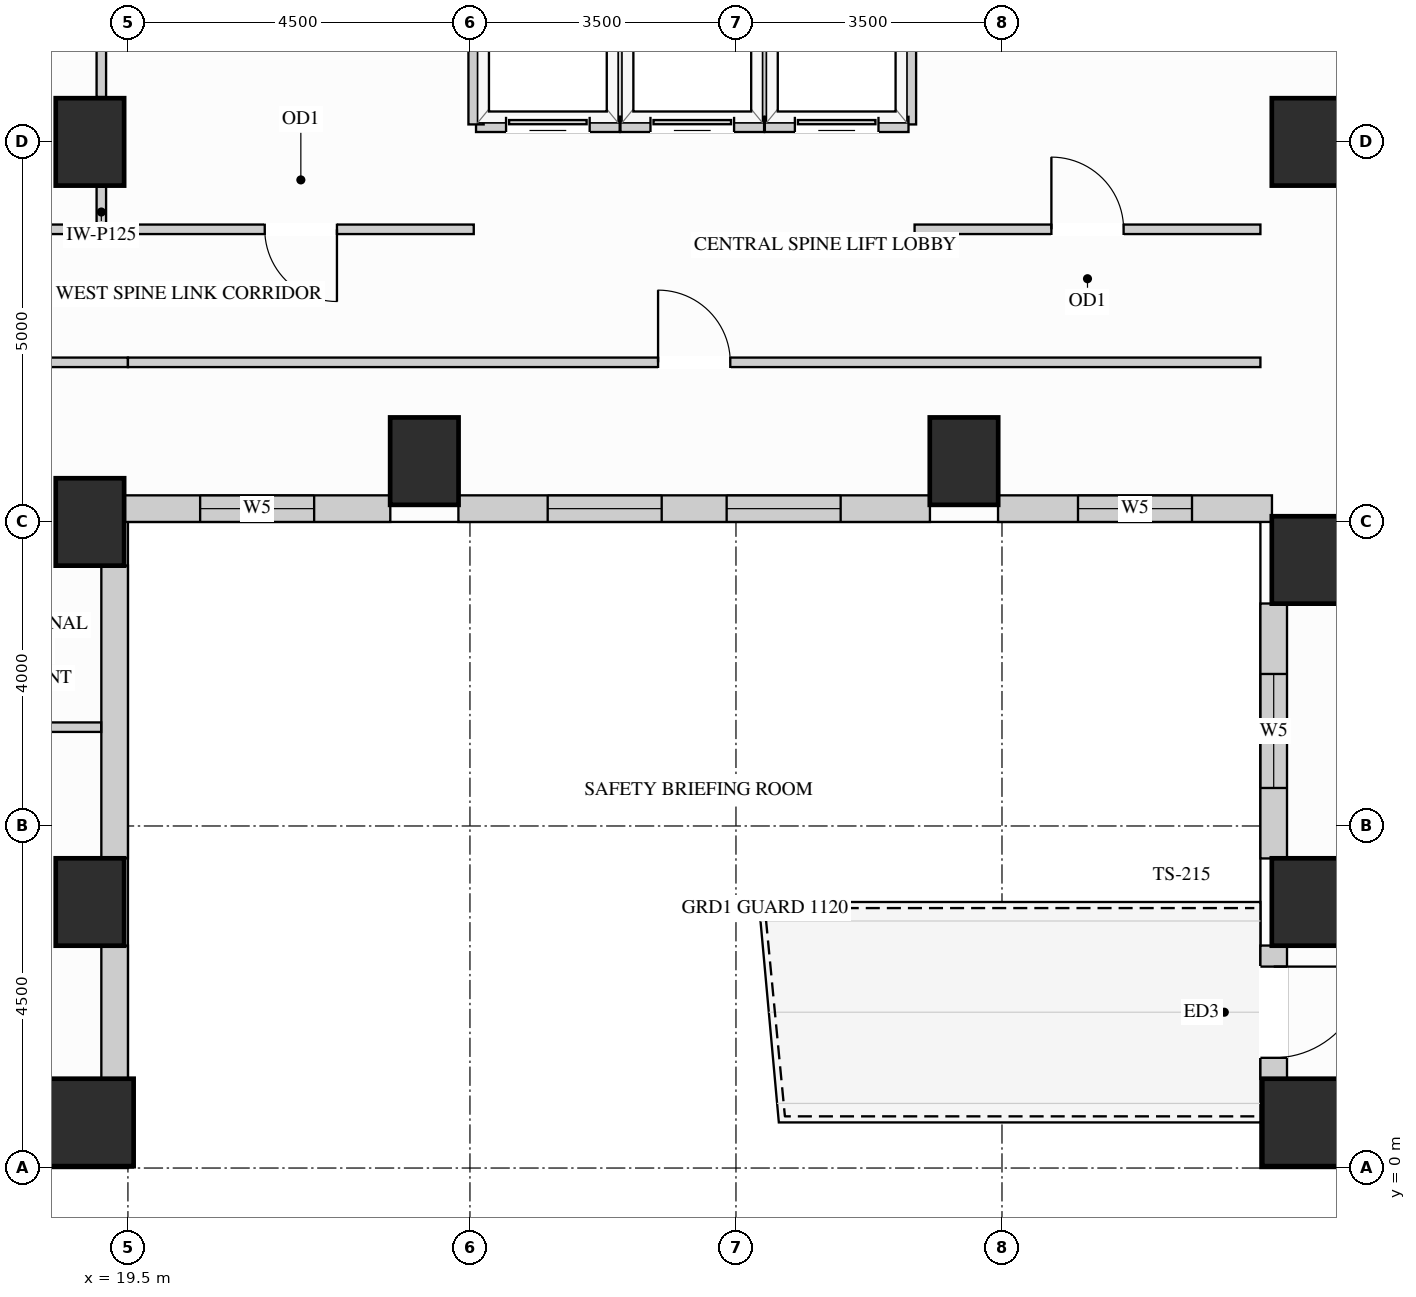
"""IFC4 building model, lengths in metres.
Left out: names, types, materials, properties, quantities, classifications, styles, units other than length and angle.
Written with IfcOpenShell. Run it as: python <this file> out.ifc"""

import sys

from ifc_helpers import new_model, si_unit, direction, frame, frame_2d, origin, origin_2d, place, context, subcontext, project, spatial, rectangle, extrude, source, transform, mapped, element, fill, save


model = new_model("IFC4")
c1 = context("Model", 3, precision=1e-05, world=origin(), true_north=direction((0.0, 1.0)))
c2 = subcontext(c1, "Body", "Model", "MODEL_VIEW")
j1 = project(units=[si_unit("LENGTHUNIT", "METRE"), si_unit("PLANEANGLEUNIT", "RADIAN")], contexts=[c1])
p1 = place(None, origin())
s1 = spatial("IfcSite", under=j1, at=p1, CompositionType="ELEMENT")
p2 = place(p1, origin())
s2 = spatial("IfcBuilding", under=s1, at=p2, CompositionType="ELEMENT")
p3 = place(p2, frame((0.0, 0.0, 91.8)))
s3 = spatial("IfcBuildingStorey", under=s2, at=p3, CompositionType="ELEMENT", Elevation=91.8)
m1 = source(origin(), c2, "Body", "SweptSolid", [
    extrude(rectangle(XDim=0.9, YDim=1.15, at=origin_2d()), origin(), (0.0, 0.0, 1.0), 3.38),
])
for number, where, z_axis, x_axis in (
    (1, (19.0, 13.5, 0.0), (0.0, 0.0, 1.0), (1.0, 0.0, 0.0)),
    (2, (19.0, 3.5, 0.0), (0.0, 0.0, 1.0), (1.0, 0.0, 0.0)),
    (3, (19.0, 8.5, 0.0), (0.0, 0.0, 1.0), (1.0, 0.0, 0.0)),
    (4, (35.0, 13.5, 0.0), (0.0, 0.0, 1.0), (1.0, 0.0, 0.0)),
    (5, (35.0, 3.5, 0.0), (0.0, 0.0, 1.0), (1.0, 0.0, 0.0)),
    (6, (35.0, 8.0, 0.0), (0.0, 0.0, 1.0), (1.0, 0.0, 0.0)),
    (7, (23.4, 9.3, 0.0), (0.0, 0.0, 1.0), (1.0, 0.0, 0.0)),
    (8, (30.5, 9.3, 0.0), (0.0, 0.0, 1.0), (1.0, 0.0, 0.0)),
):
    element("IfcColumn", number, at=place(p3, frame(where, z_axis=z_axis, x_axis=x_axis)), inside=s3, PredefinedType="COLUMN", context=c2, shape_type="MappedRepresentation", body=[
        mapped(m1, transform((0.0, 0.0, 0.0), x_axis=(1.0, 0.0, 0.0), y_axis=(0.0, 1.0, 0.0), z_axis=(0.0, 0.0, 1.0))),
    ])
m2 = source(origin(), c2, "Body", "SweptSolid", [
    extrude(rectangle(XDim=1.15, YDim=1.15, at=origin_2d()), origin(), (0.0, 0.0, 1.0), 3.38),
])
for number, where, z_axis, x_axis in (
    (9, (19.0, 0.6, 0.0), (0.0, 0.0, 1.0), (1.0, 0.0, 0.0)),
    (10, (35.0, 0.6, 0.0), (0.0, 0.0, 1.0), (1.0, 0.0, 0.0)),
):
    element("IfcColumn", number, at=place(p3, frame(where, z_axis=z_axis, x_axis=x_axis)), inside=s3, PredefinedType="COLUMN", context=c2, shape_type="MappedRepresentation", body=[
        mapped(m2, transform((0.0, 0.0, 0.0), x_axis=(1.0, 0.0, 0.0), y_axis=(0.0, 1.0, 0.0), z_axis=(0.0, 0.0, 1.0))),
    ])
m3 = source(origin(), c2, "Body", "SweptSolid", [
    extrude(rectangle(XDim=1.754, YDim=0.35, at=frame_2d((0.877, 0.0))), origin(), (0.0, 0.0, 1.0), 2.519),
])
p4 = place(p3, frame((19.325, 1.173, 0.0), z_axis=(0.0, 0.0, 1.0), x_axis=(0.0, 1.0, 0.0)))
e11 = element("IfcWall", 11, at=p4, inside=s3, PredefinedType="SOLIDWALL", context=c2, shape_type="MappedRepresentation", body=[
    mapped(m3, transform((0.0, 0.0, 0.0), x_axis=(1.0, 0.0, 0.0), y_axis=(0.0, 1.0, 0.0), z_axis=(0.0, 0.0, 1.0))),
])
m4 = source(origin(), c2, "Body", "SweptSolid", [
    extrude(rectangle(XDim=3.854, YDim=0.35, at=frame_2d((1.927, 0.0))), origin(), (0.0, 0.0, 1.0), 2.519),
])
p5 = place(p3, frame((19.325, 4.073, 0.0), z_axis=(0.0, 0.0, 1.0), x_axis=(0.0, 1.0, 0.0)))
e12 = element("IfcWall", 12, at=p5, inside=s3, PredefinedType="SOLIDWALL", context=c2, shape_type="MappedRepresentation", body=[
    mapped(m4, transform((0.0, 0.0, 0.0), x_axis=(1.0, 0.0, 0.0), y_axis=(0.0, 1.0, 0.0), z_axis=(0.0, 0.0, 1.0))),
])
p6 = place(p3, frame((19.448, 8.675, 0.0), z_axis=(0.0, 0.0, 1.0), x_axis=(1.0, 0.0, 0.0)))
e13 = element("IfcWall", 13, at=p6, inside=s3, PredefinedType="SOLIDWALL", context=c2, shape_type="SweptSolid", body=[
    extrude(rectangle(XDim=3.504, YDim=0.35, at=frame_2d((1.752, 0.0))), origin(), (0.0, 0.0, 1.0), 3.365),
])
p7 = place(p6, frame((1.002, 0.0, 0.78)))
e14 = element("IfcOpeningElement", 14, at=p7, cuts=e13, PredefinedType="OPENING", context=c2, shape_type="SweptSolid", body=[
    extrude(rectangle(XDim=1.5, YDim=2.0, at=frame_2d((0.75, 1.0))), frame((0.0, 0.185, 0.0), z_axis=(0.0, -1.0, 0.0), x_axis=(1.0, 0.0, 0.0)), (0.0, 0.0, 1.0), 0.37),
])
p8 = place(p3, frame((23.848, 8.675, 0.0), z_axis=(0.0, 0.0, 1.0), x_axis=(1.0, 0.0, 0.0)))
e15 = element("IfcWall", 15, at=p8, inside=s3, PredefinedType="SOLIDWALL", context=c2, shape_type="SweptSolid", body=[
    extrude(rectangle(XDim=6.204, YDim=0.35, at=frame_2d((3.102, 0.0))), origin(), (0.0, 0.0, 1.0), 3.365),
])
p9 = place(p8, frame((1.175, 0.0, 0.78)))
e16 = element("IfcOpeningElement", 16, at=p9, cuts=e15, PredefinedType="OPENING", context=c2, shape_type="SweptSolid", body=[
    extrude(rectangle(XDim=1.5, YDim=2.0, at=frame_2d((0.75, 1.0))), frame((0.0, 0.185, 0.0), z_axis=(0.0, -1.0, 0.0), x_axis=(1.0, 0.0, 0.0)), (0.0, 0.0, 1.0), 0.37),
])
p10 = place(p8, frame((3.529, 0.0, 0.78)))
e17 = element("IfcOpeningElement", 17, at=p10, cuts=e15, PredefinedType="OPENING", context=c2, shape_type="SweptSolid", body=[
    extrude(rectangle(XDim=1.5, YDim=2.0, at=frame_2d((0.75, 1.0))), frame((0.0, 0.185, 0.0), z_axis=(0.0, -1.0, 0.0), x_axis=(1.0, 0.0, 0.0)), (0.0, 0.0, 1.0), 0.37),
])
p11 = place(p3, frame((30.948, 8.675, 0.0), z_axis=(0.0, 0.0, 1.0), x_axis=(1.0, 0.0, 0.0)))
e18 = element("IfcWall", 18, at=p11, inside=s3, PredefinedType="SOLIDWALL", context=c2, shape_type="SweptSolid", body=[
    extrude(rectangle(XDim=3.604, YDim=0.35, at=frame_2d((1.802, 0.0))), origin(), (0.0, 0.0, 1.0), 3.365),
])
p12 = place(p11, frame((1.052, 0.0, 0.78)))
e19 = element("IfcOpeningElement", 19, at=p12, cuts=e18, PredefinedType="OPENING", context=c2, shape_type="SweptSolid", body=[
    extrude(rectangle(XDim=1.5, YDim=2.0, at=frame_2d((0.75, 1.0))), frame((0.0, 0.185, 0.0), z_axis=(0.0, -1.0, 0.0), x_axis=(1.0, 0.0, 0.0)), (0.0, 0.0, 1.0), 0.37),
])
p13 = place(p3, frame((34.575, 7.427, 0.0), z_axis=(0.0, 0.0, 1.0), x_axis=(0.0, -1.0, 0.0)))
e20 = element("IfcWall", 20, at=p13, inside=s3, PredefinedType="SOLIDWALL", context=c2, shape_type="SweptSolid", body=[
    extrude(rectangle(XDim=3.354, YDim=0.35, at=frame_2d((1.677, 0.0))), origin(), (0.0, 0.0, 1.0), 3.365),
])
p14 = place(p13, frame((0.927, 0.0, 0.78)))
e21 = element("IfcOpeningElement", 21, at=p14, cuts=e20, PredefinedType="OPENING", context=c2, shape_type="SweptSolid", body=[
    extrude(rectangle(XDim=1.5, YDim=2.0, at=frame_2d((0.75, 1.0))), frame((0.0, 0.185, 0.0), z_axis=(0.0, -1.0, 0.0), x_axis=(1.0, 0.0, 0.0)), (0.0, 0.0, 1.0), 0.37),
])
p15 = place(p3, frame((34.575, 2.927, 0.0), z_axis=(0.0, 0.0, 1.0), x_axis=(0.0, -1.0, 0.0)))
e22 = element("IfcWall", 22, at=p15, inside=s3, PredefinedType="SOLIDWALL", context=c2, shape_type="SweptSolid", body=[
    extrude(rectangle(XDim=1.754, YDim=0.35, at=frame_2d((0.877, 0.0))), origin(), (0.0, 0.0, 1.0), 3.365),
])
p16 = place(p15, frame((0.277, 0.0, 0.0)))
e23 = element("IfcOpeningElement", 23, at=p16, cuts=e22, PredefinedType="OPENING", context=c2, shape_type="SweptSolid", body=[
    extrude(rectangle(XDim=1.2, YDim=2.15, at=frame_2d((0.6, 1.075))), frame((0.0, 0.185, 0.0), z_axis=(0.0, -1.0, 0.0), x_axis=(1.0, 0.0, 0.0)), (0.0, 0.0, 1.0), 0.37),
])
m5 = source(origin(), c2, "Body", "SweptSolid", [
    extrude(rectangle(XDim=0.56, YDim=0.125, at=frame_2d((0.28, 0.0))), origin(), (0.0, 0.0, 1.0), 2.677),
])
p17 = place(p3, frame((19.15, 12.35, 0.0), z_axis=(0.0, 0.0, 1.0), x_axis=(0.0, 1.0, 0.0)))
e24 = element("IfcWall", 24, at=p17, inside=s3, PredefinedType="PARTITIONING", context=c2, shape_type="MappedRepresentation", body=[
    mapped(m5, transform((0.0, 0.0, 0.0), x_axis=(1.0, 0.0, 0.0), y_axis=(0.0, 1.0, 0.0), z_axis=(0.0, 0.0, 1.0))),
])
m6 = source(origin(), c2, "Body", "SweptSolid", [
    extrude(rectangle(XDim=3.32, YDim=0.125, at=frame_2d((1.66, 0.0))), origin(), (0.0, 0.0, 1.0), 2.677),
])
p18 = place(p3, frame((19.15, 14.09, 0.0), z_axis=(0.0, 0.0, 1.0), x_axis=(0.0, 1.0, 0.0)))
e25 = element("IfcWall", 25, at=p18, inside=s3, PredefinedType="PARTITIONING", context=c2, shape_type="MappedRepresentation", body=[
    mapped(m6, transform((0.0, 0.0, 0.0), x_axis=(1.0, 0.0, 0.0), y_axis=(0.0, 1.0, 0.0), z_axis=(0.0, 0.0, 1.0))),
])
p19 = place(p3, frame((29.85, 12.35, 0.0), z_axis=(0.0, 0.0, 1.0), x_axis=(1.0, 0.0, 0.0)))
e26 = element("IfcWall", 26, at=p19, inside=s3, PredefinedType="PARTITIONING", context=c2, shape_type="SweptSolid", body=[
    extrude(rectangle(XDim=4.55, YDim=0.125, at=frame_2d((2.275, 0.0))), origin(), (0.0, 0.0, 1.0), 3.365),
])
p20 = place(p19, frame((1.8, 0.0, 0.0)))
e27 = element("IfcOpeningElement", 27, at=p20, cuts=e26, PredefinedType="OPENING", context=c2, shape_type="SweptSolid", body=[
    extrude(rectangle(XDim=0.95, YDim=2.15, at=frame_2d((0.475, 1.075))), frame((0.0, 0.073, 0.0), z_axis=(0.0, -1.0, 0.0), x_axis=(1.0, 0.0, 0.0)), (0.0, 0.0, 1.0), 0.145),
])
m7 = source(origin(), c2, "Body", "SweptSolid", [
    extrude(rectangle(XDim=2.95, YDim=0.125, at=frame_2d((1.475, 0.0))), origin(), (0.0, 0.0, 1.0), 3.365),
])
p21 = place(p3, frame((16.55, 12.35, 0.0), z_axis=(0.0, 0.0, 1.0), x_axis=(1.0, 0.0, 0.0)))
e28 = element("IfcWall", 28, at=p21, inside=s3, PredefinedType="PARTITIONING", context=c2, shape_type="MappedRepresentation", body=[
    mapped(m7, transform((0.0, 0.0, 0.0), x_axis=(1.0, 0.0, 0.0), y_axis=(0.0, 1.0, 0.0), z_axis=(0.0, 0.0, 1.0))),
])
p22 = place(p3, frame((19.5, 12.35, 0.0), z_axis=(0.0, 0.0, 1.0), x_axis=(1.0, 0.0, 0.0)))
e29 = element("IfcWall", 29, at=p22, inside=s3, PredefinedType="PARTITIONING", context=c2, shape_type="SweptSolid", body=[
    extrude(rectangle(XDim=4.55, YDim=0.125, at=frame_2d((2.275, 0.0))), origin(), (0.0, 0.0, 1.0), 3.365),
])
p23 = place(p22, frame((1.8, 0.0, 0.0)))
e30 = element("IfcOpeningElement", 30, at=p23, cuts=e29, PredefinedType="OPENING", context=c2, shape_type="SweptSolid", body=[
    extrude(rectangle(XDim=0.95, YDim=2.15, at=frame_2d((0.475, 1.075))), frame((0.0, 0.073, 0.0), z_axis=(0.0, -1.0, 0.0), x_axis=(1.0, 0.0, 0.0)), (0.0, 0.0, 1.0), 0.145),
])
p24 = place(p3, frame((16.55, 10.6, 0.0), z_axis=(0.0, 0.0, 1.0), x_axis=(1.0, 0.0, 0.0)))
e31 = element("IfcWall", 31, at=p24, inside=s3, PredefinedType="PARTITIONING", context=c2, shape_type="MappedRepresentation", body=[
    mapped(m7, transform((0.0, 0.0, 0.0), x_axis=(1.0, 0.0, 0.0), y_axis=(0.0, 1.0, 0.0), z_axis=(0.0, 0.0, 1.0))),
])
p25 = place(p3, frame((19.5, 10.6, 0.0), z_axis=(0.0, 0.0, 1.0), x_axis=(1.0, 0.0, 0.0)))
e32 = element("IfcWall", 32, at=p25, inside=s3, PredefinedType="PARTITIONING", context=c2, shape_type="SweptSolid", body=[
    extrude(rectangle(XDim=14.9, YDim=0.125, at=frame_2d((7.45, 0.0))), origin(), (0.0, 0.0, 1.0), 3.365),
])
p26 = place(p25, frame((6.975, 0.0, 0.0)))
e33 = element("IfcOpeningElement", 33, at=p26, cuts=e32, PredefinedType="OPENING", context=c2, shape_type="SweptSolid", body=[
    extrude(rectangle(XDim=0.95, YDim=2.15, at=frame_2d((0.475, 1.075))), frame((0.0, 0.073, 0.0), z_axis=(0.0, -1.0, 0.0), x_axis=(1.0, 0.0, 0.0)), (0.0, 0.0, 1.0), 0.145),
])
m8 = source(origin(), c2, "Body", "SweptSolid", [
    extrude(rectangle(XDim=2.598, YDim=0.125, at=frame_2d((1.299, 0.0))), origin(), (0.0, 0.0, 1.0), 3.365),
])
p27 = place(p3, frame((16.55, 5.8, 0.0), z_axis=(0.0, 0.0, 1.0), x_axis=(1.0, 0.0, 0.0)))
e34 = element("IfcWall", 34, at=p27, inside=s3, PredefinedType="PARTITIONING", context=c2, shape_type="MappedRepresentation", body=[
    mapped(m8, transform((0.0, 0.0, 0.0), x_axis=(1.0, 0.0, 0.0), y_axis=(0.0, 1.0, 0.0), z_axis=(0.0, 0.0, 1.0))),
])
m9 = source(origin(), c2, "Body", "SweptSolid", [
    extrude(rectangle(XDim=2.29, YDim=0.2, at=frame_2d((1.145, 0.0))), origin(), (0.0, 0.0, 1.0), 3.365),
])
p28 = place(p3, frame((25.97, 13.73, 0.0), z_axis=(0.0, 0.0, 1.0), x_axis=(0.0, 1.0, 0.0)))
e35 = element("IfcWall", 35, at=p28, inside=s3, PredefinedType="PARTITIONING", context=c2, shape_type="MappedRepresentation", body=[
    mapped(m9, transform((0.0, 0.0, 0.0), x_axis=(1.0, 0.0, 0.0), y_axis=(0.0, 1.0, 0.0), z_axis=(0.0, 0.0, 1.0))),
])
p29 = place(p3, frame((24.08, 13.73, 0.0), z_axis=(0.0, 0.0, 1.0), x_axis=(1.0, 0.0, 0.0)))
e36 = element("IfcWall", 36, at=p29, inside=s3, PredefinedType="PARTITIONING", context=c2, shape_type="SweptSolid", body=[
    extrude(rectangle(XDim=1.89, YDim=0.2, at=frame_2d((0.945, 0.0))), origin(), (0.0, 0.0, 1.0), 2.446),
])
p30 = place(p29, frame((0.395, 0.0, 0.0)))
e37 = element("IfcOpeningElement", 37, at=p30, cuts=e36, PredefinedType="OPENING", context=c2, shape_type="SweptSolid", body=[
    extrude(rectangle(XDim=1.1, YDim=2.2, at=frame_2d((0.55, 1.1))), frame((0.0, 0.11, 0.0), z_axis=(0.0, -1.0, 0.0), x_axis=(1.0, 0.0, 0.0)), (0.0, 0.0, 1.0), 0.22),
])
for number, where, z_axis, x_axis in (
    (38, (24.08, 13.73, 0.0), (0.0, 0.0, 1.0), (0.0, 1.0, 0.0)),
    (39, (27.87, 13.73, 0.0), (0.0, 0.0, 1.0), (0.0, 1.0, 0.0)),
):
    element("IfcWall", number, at=place(p3, frame(where, z_axis=z_axis, x_axis=x_axis)), inside=s3, PredefinedType="PARTITIONING", context=c2, shape_type="MappedRepresentation", body=[
        mapped(m9, transform((0.0, 0.0, 0.0), x_axis=(1.0, 0.0, 0.0), y_axis=(0.0, 1.0, 0.0), z_axis=(0.0, 0.0, 1.0))),
    ])
p31 = place(p3, frame((25.98, 13.73, 0.0), z_axis=(0.0, 0.0, 1.0), x_axis=(1.0, 0.0, 0.0)))
e40 = element("IfcWall", 40, at=p31, inside=s3, PredefinedType="PARTITIONING", context=c2, shape_type="SweptSolid", body=[
    extrude(rectangle(XDim=1.89, YDim=0.2, at=frame_2d((0.945, 0.0))), origin(), (0.0, 0.0, 1.0), 2.446),
])
p32 = place(p31, frame((0.395, 0.0, 0.0)))
e41 = element("IfcOpeningElement", 41, at=p32, cuts=e40, PredefinedType="OPENING", context=c2, shape_type="SweptSolid", body=[
    extrude(rectangle(XDim=1.1, YDim=2.2, at=frame_2d((0.55, 1.1))), frame((0.0, 0.11, 0.0), z_axis=(0.0, -1.0, 0.0), x_axis=(1.0, 0.0, 0.0)), (0.0, 0.0, 1.0), 0.22),
])
p33 = place(p3, frame((29.77, 13.73, 0.0), z_axis=(0.0, 0.0, 1.0), x_axis=(0.0, 1.0, 0.0)))
e42 = element("IfcWall", 42, at=p33, inside=s3, PredefinedType="PARTITIONING", context=c2, shape_type="MappedRepresentation", body=[
    mapped(m9, transform((0.0, 0.0, 0.0), x_axis=(1.0, 0.0, 0.0), y_axis=(0.0, 1.0, 0.0), z_axis=(0.0, 0.0, 1.0))),
])
p34 = place(p3, frame((27.88, 13.73, 0.0), z_axis=(0.0, 0.0, 1.0), x_axis=(1.0, 0.0, 0.0)))
e43 = element("IfcWall", 43, at=p34, inside=s3, PredefinedType="PARTITIONING", context=c2, shape_type="SweptSolid", body=[
    extrude(rectangle(XDim=1.89, YDim=0.2, at=frame_2d((0.945, 0.0))), origin(), (0.0, 0.0, 1.0), 2.446),
])
p35 = place(p34, frame((0.395, 0.0, 0.0)))
e44 = element("IfcOpeningElement", 44, at=p35, cuts=e43, PredefinedType="OPENING", context=c2, shape_type="SweptSolid", body=[
    extrude(rectangle(XDim=1.1, YDim=2.2, at=frame_2d((0.55, 1.1))), frame((0.0, 0.11, 0.0), z_axis=(0.0, -1.0, 0.0), x_axis=(1.0, 0.0, 0.0)), (0.0, 0.0, 1.0), 0.22),
])
m10 = source(origin(), c2, "Body", "SweptSolid", [
    extrude(rectangle(XDim=1.2, YDim=2.15, at=frame_2d((0.6, 1.075))), frame((0.0, 0.025, 0.0), z_axis=(0.0, -1.0, 0.0), x_axis=(1.0, 0.0, 0.0)), (0.0, 0.0, 1.0), 0.05),
])
p36 = place(p16, frame((1.2, 0.0, 0.0), z_axis=(0.0, 0.0, 1.0), x_axis=(-1.0, 0.0, 0.0)))
e45 = element("IfcDoor", 45, at=p36, inside=s3, OperationType="SINGLE_SWING_LEFT", PredefinedType="DOOR", context=c2, shape_type="MappedRepresentation", body=[
    mapped(m10, transform((0.0, 0.0, 0.0), x_axis=(1.0, 0.0, 0.0), y_axis=(0.0, 1.0, 0.0), z_axis=(0.0, 0.0, 1.0))),
])
fill(e23, e45)
m11 = source(origin(), c2, "Body", "SweptSolid", [
    extrude(rectangle(XDim=1.1, YDim=2.2, at=frame_2d((0.55, 1.1))), frame((0.0, 0.025, 0.0), z_axis=(0.0, -1.0, 0.0), x_axis=(1.0, 0.0, 0.0)), (0.0, 0.0, 1.0), 0.05),
])
p37 = place(p30, origin())
e46 = element("IfcDoor", 46, at=p37, inside=s3, OperationType="SLIDING_TO_LEFT", PredefinedType="DOOR", context=c2, shape_type="MappedRepresentation", body=[
    mapped(m11, transform((0.0, 0.0, 0.0), x_axis=(1.0, 0.0, 0.0), y_axis=(0.0, 1.0, 0.0), z_axis=(0.0, 0.0, 1.0))),
])
fill(e37, e46)
p38 = place(p32, origin())
e47 = element("IfcDoor", 47, at=p38, inside=s3, OperationType="SLIDING_TO_LEFT", PredefinedType="DOOR", context=c2, shape_type="MappedRepresentation", body=[
    mapped(m11, transform((0.0, 0.0, 0.0), x_axis=(1.0, 0.0, 0.0), y_axis=(0.0, 1.0, 0.0), z_axis=(0.0, 0.0, 1.0))),
])
fill(e41, e47)
p39 = place(p35, origin())
e48 = element("IfcDoor", 48, at=p39, inside=s3, OperationType="SLIDING_TO_LEFT", PredefinedType="DOOR", context=c2, shape_type="MappedRepresentation", body=[
    mapped(m11, transform((0.0, 0.0, 0.0), x_axis=(1.0, 0.0, 0.0), y_axis=(0.0, 1.0, 0.0), z_axis=(0.0, 0.0, 1.0))),
])
fill(e44, e48)
m12 = source(origin(), c2, "Body", "SweptSolid", [
    extrude(rectangle(XDim=0.95, YDim=2.15, at=frame_2d((0.475, 1.075))), frame((0.0, 0.025, 0.0), z_axis=(0.0, -1.0, 0.0), x_axis=(1.0, 0.0, 0.0)), (0.0, 0.0, 1.0), 0.05),
])
p40 = place(p23, origin())
e49 = element("IfcDoor", 49, at=p40, inside=s3, OperationType="SINGLE_SWING_RIGHT", PredefinedType="DOOR", context=c2, shape_type="MappedRepresentation", body=[
    mapped(m12, transform((0.0, 0.0, 0.0), x_axis=(1.0, 0.0, 0.0), y_axis=(0.0, 1.0, 0.0), z_axis=(0.0, 0.0, 1.0))),
])
fill(e30, e49)
p41 = place(p20, origin())
e50 = element("IfcDoor", 50, at=p41, inside=s3, OperationType="SINGLE_SWING_LEFT", PredefinedType="DOOR", context=c2, shape_type="MappedRepresentation", body=[
    mapped(m12, transform((0.0, 0.0, 0.0), x_axis=(1.0, 0.0, 0.0), y_axis=(0.0, 1.0, 0.0), z_axis=(0.0, 0.0, 1.0))),
])
fill(e27, e50)
p42 = place(p26, origin())
e51 = element("IfcDoor", 51, at=p42, inside=s3, OperationType="SINGLE_SWING_LEFT", PredefinedType="DOOR", context=c2, shape_type="MappedRepresentation", body=[
    mapped(m12, transform((0.0, 0.0, 0.0), x_axis=(1.0, 0.0, 0.0), y_axis=(0.0, 1.0, 0.0), z_axis=(0.0, 0.0, 1.0))),
])
fill(e33, e51)
m13 = source(origin(), c2, "Body", "SweptSolid", [
    extrude(rectangle(XDim=1.5, YDim=2.0, at=frame_2d((0.75, 1.0))), frame((0.0, 0.03, 0.0), z_axis=(0.0, -1.0, 0.0), x_axis=(1.0, 0.0, 0.0)), (0.0, 0.0, 1.0), 0.06),
])
p43 = place(p7, origin())
e52 = element("IfcWindow", 52, at=p43, inside=s3, PartitioningType="SINGLE_PANEL", PredefinedType="WINDOW", context=c2, shape_type="MappedRepresentation", body=[
    mapped(m13, transform((0.0, 0.0, 0.0), x_axis=(1.0, 0.0, 0.0), y_axis=(0.0, 1.0, 0.0), z_axis=(0.0, 0.0, 1.0))),
])
fill(e14, e52)
p44 = place(p9, origin())
e53 = element("IfcWindow", 53, at=p44, inside=s3, PartitioningType="SINGLE_PANEL", PredefinedType="WINDOW", context=c2, shape_type="MappedRepresentation", body=[
    mapped(m13, transform((0.0, 0.0, 0.0), x_axis=(1.0, 0.0, 0.0), y_axis=(0.0, 1.0, 0.0), z_axis=(0.0, 0.0, 1.0))),
])
fill(e16, e53)
p45 = place(p10, origin())
e54 = element("IfcWindow", 54, at=p45, inside=s3, PartitioningType="SINGLE_PANEL", PredefinedType="WINDOW", context=c2, shape_type="MappedRepresentation", body=[
    mapped(m13, transform((0.0, 0.0, 0.0), x_axis=(1.0, 0.0, 0.0), y_axis=(0.0, 1.0, 0.0), z_axis=(0.0, 0.0, 1.0))),
])
fill(e17, e54)
p46 = place(p12, origin())
e55 = element("IfcWindow", 55, at=p46, inside=s3, PartitioningType="SINGLE_PANEL", PredefinedType="WINDOW", context=c2, shape_type="MappedRepresentation", body=[
    mapped(m13, transform((0.0, 0.0, 0.0), x_axis=(1.0, 0.0, 0.0), y_axis=(0.0, 1.0, 0.0), z_axis=(0.0, 0.0, 1.0))),
])
fill(e19, e55)
p47 = place(p14, origin())
e56 = element("IfcWindow", 56, at=p47, inside=s3, PartitioningType="SINGLE_PANEL", PredefinedType="WINDOW", context=c2, shape_type="MappedRepresentation", body=[
    mapped(m13, transform((0.0, 0.0, 0.0), x_axis=(1.0, 0.0, 0.0), y_axis=(0.0, 1.0, 0.0), z_axis=(0.0, 0.0, 1.0))),
])
fill(e21, e56)
save(model, sys.argv[1])
